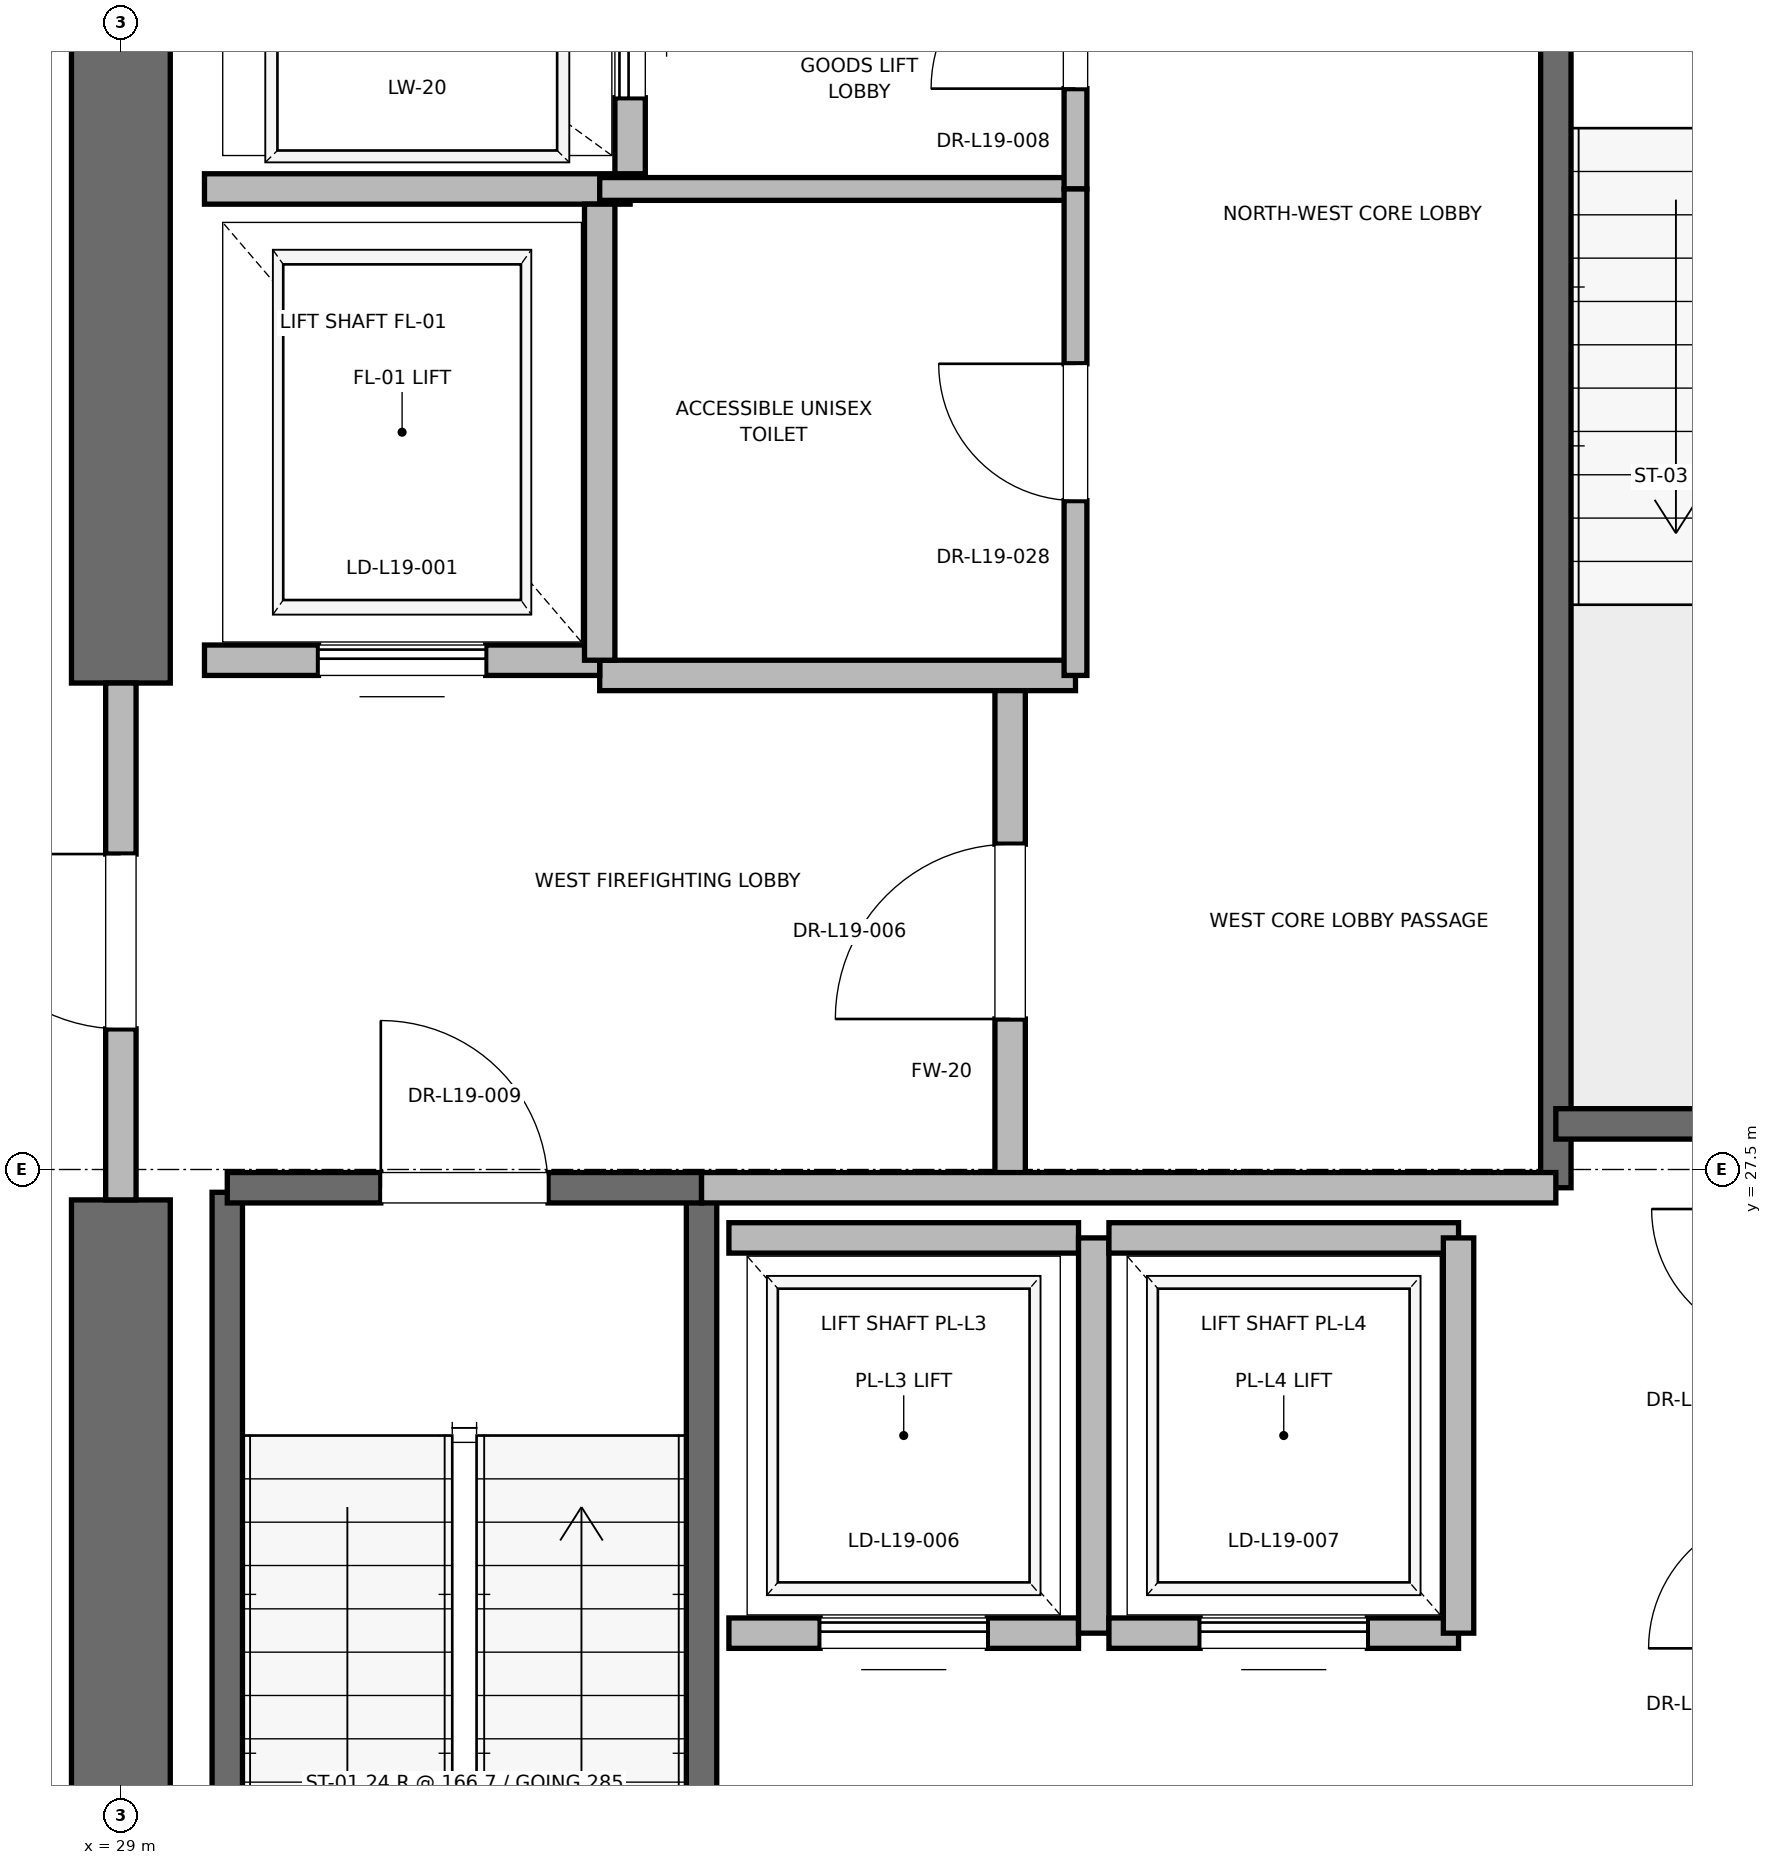
"""IFC4 building model, lengths in metres.
Left out: names, types, materials, properties, quantities, classifications, styles, units other than length and angle.
Written with IfcOpenShell. Run it as: python <this file> out.ifc"""

import sys

from ifc_helpers import new_model, si_unit, direction, frame, frame_2d, origin, place, context, subcontext, project, spatial, rectangle, extrude, element, fill, save


model = new_model("IFC4")
c1 = context("Model", 3, precision=1e-05, world=origin(), true_north=direction((0.0, 1.0)))
c2 = subcontext(c1, "Body", "Model", "MODEL_VIEW")
j1 = project(units=[si_unit("LENGTHUNIT", "METRE"), si_unit("PLANEANGLEUNIT", "RADIAN")], contexts=[c1])
p1 = place(None, origin())
s1 = spatial("IfcSite", under=j1, at=p1, CompositionType="ELEMENT")
p2 = place(p1, origin())
s2 = spatial("IfcBuilding", under=s1, at=p2, CompositionType="ELEMENT")
p3 = place(p2, frame((0.0, 0.0, 83.6)))
s3 = spatial("IfcBuildingStorey", under=s2, at=p3, CompositionType="ELEMENT", Elevation=83.6)
p4 = place(p3, frame((29.0, 18.5, 0.0), z_axis=(0.0, 0.0, 1.0), x_axis=(0.0, 1.0, 0.0)))
e1 = element("IfcWall", 1, at=p4, inside=s3, PredefinedType="SHEAR", context=c2, shape_type="SweptSolid", body=[
    extrude(rectangle(XDim=8.8, YDim=0.65, at=frame_2d((4.4, 0.0))), origin(), (0.0, 0.0, 1.0), 3.76),
])
p5 = place(p3, frame((29.0, 30.7, 0.0), z_axis=(0.0, 0.0, 1.0), x_axis=(0.0, 1.0, 0.0)))
e2 = element("IfcWall", 2, at=p5, inside=s3, PredefinedType="SHEAR", context=c2, shape_type="SweptSolid", body=[
    extrude(rectangle(XDim=5.8, YDim=0.65, at=frame_2d((2.9, 0.0))), origin(), (0.0, 0.0, 1.0), 3.76),
])
p6 = place(p3, frame((29.7, 19.2, 0.0), z_axis=(0.0, 0.0, 1.0), x_axis=(0.0, 1.0, 0.0)))
e3 = element("IfcWall", 3, at=p6, inside=s3, PredefinedType="SOLIDWALL", context=c2, shape_type="SweptSolid", body=[
    extrude(rectangle(XDim=8.15, YDim=0.2, at=frame_2d((4.075, 0.0))), origin(), (0.0, 0.0, 1.0), 3.76),
])
p7 = place(p3, frame((32.82, 18.6, 0.0), z_axis=(0.0, 0.0, 1.0), x_axis=(0.0, 1.0, 0.0)))
e4 = element("IfcWall", 4, at=p7, inside=s3, PredefinedType="SOLIDWALL", context=c2, shape_type="SweptSolid", body=[
    extrude(rectangle(XDim=8.78, YDim=0.2, at=frame_2d((4.39, 0.0))), origin(), (0.0, 0.0, 1.0), 3.76),
])
p8 = place(p3, frame((29.7, 27.38, 0.0), z_axis=(0.0, 0.0, 1.0), x_axis=(1.0, 0.0, 0.0)))
e5 = element("IfcWall", 5, at=p8, inside=s3, PredefinedType="SOLIDWALL", context=c2, shape_type="SweptSolid", body=[
    extrude(rectangle(XDim=3.12, YDim=0.2, at=frame_2d((1.56, 0.0))), origin(), (0.0, 0.0, 1.0), 3.76),
])
p9 = place(p8, frame((1.01, 0.0, 0.0)))
e6 = element("IfcOpeningElement", 6, at=p9, cuts=e5, PredefinedType="OPENING", context=c2, shape_type="SweptSolid", body=[
    extrude(rectangle(XDim=1.1, YDim=2.15, at=frame_2d((0.55, 1.075))), frame((0.0, 0.1, 0.0), z_axis=(0.0, -1.0, 0.0), x_axis=(1.0, 0.0, 0.0)), (0.0, 0.0, 1.0), 0.2),
])
p10 = place(p3, frame((38.44, 27.38, 0.0), z_axis=(0.0, 0.0, 1.0), x_axis=(0.0, 1.0, 0.0)))
e7 = element("IfcWall", 7, at=p10, inside=s3, PredefinedType="SOLIDWALL", context=c2, shape_type="SweptSolid", body=[
    extrude(rectangle(XDim=8.87, YDim=0.2, at=frame_2d((4.435, 0.0))), origin(), (0.0, 0.0, 1.0), 3.76),
])
p11 = place(p3, frame((38.44, 27.8, 0.0), z_axis=(0.0, 0.0, 1.0), x_axis=(1.0, 0.0, 0.0)))
e8 = element("IfcWall", 8, at=p11, inside=s3, PredefinedType="SOLIDWALL", context=c2, shape_type="SweptSolid", body=[
    extrude(rectangle(XDim=3.32, YDim=0.2, at=frame_2d((1.66, 0.0))), origin(), (0.0, 0.0, 1.0), 3.76),
])
p12 = place(p3, frame((34.85, 27.38, 0.0), z_axis=(0.0, 0.0, 1.0), x_axis=(0.0, 1.0, 0.0)))
e9 = element("IfcWall", 9, at=p12, inside=s3, PredefinedType="PARTITIONING", context=c2, shape_type="SweptSolid", body=[
    extrude(rectangle(XDim=3.37, YDim=0.2, at=frame_2d((1.685, 0.0))), origin(), (0.0, 0.0, 1.0), 3.76),
])
p13 = place(p12, frame((1.11, 0.0, 0.0)))
e10 = element("IfcOpeningElement", 10, at=p13, cuts=e9, PredefinedType="OPENING", context=c2, shape_type="SweptSolid", body=[
    extrude(rectangle(XDim=1.15, YDim=2.2, at=frame_2d((0.575, 1.1))), frame((0.0, 0.1, 0.0), z_axis=(0.0, -1.0, 0.0), x_axis=(1.0, 0.0, 0.0)), (0.0, 0.0, 1.0), 0.2),
])
p14 = place(p3, frame((29.0, 27.3, 0.0), z_axis=(0.0, 0.0, 1.0), x_axis=(0.0, 1.0, 0.0)))
e11 = element("IfcWall", 11, at=p14, inside=s3, PredefinedType="PARTITIONING", context=c2, shape_type="SweptSolid", body=[
    extrude(rectangle(XDim=3.4, YDim=0.2, at=frame_2d((1.7, 0.0))), origin(), (0.0, 0.0, 1.0), 2.54),
])
p15 = place(p14, frame((1.125, 0.0, 0.0)))
e12 = element("IfcOpeningElement", 12, at=p15, cuts=e11, PredefinedType="OPENING", context=c2, shape_type="SweptSolid", body=[
    extrude(rectangle(XDim=1.15, YDim=2.2, at=frame_2d((0.575, 1.1))), frame((0.0, 0.1, 0.0), z_axis=(0.0, -1.0, 0.0), x_axis=(1.0, 0.0, 0.0)), (0.0, 0.0, 1.0), 0.2),
])
p16 = place(p3, frame((32.82, 27.38, 0.0), z_axis=(0.0, 0.0, 1.0), x_axis=(1.0, 0.0, 0.0)))
e13 = element("IfcWall", 13, at=p16, inside=s3, PredefinedType="PARTITIONING", context=c2, shape_type="SweptSolid", body=[
    extrude(rectangle(XDim=5.62, YDim=0.2, at=frame_2d((2.81, 0.0))), origin(), (0.0, 0.0, 1.0), 3.76),
])
p17 = place(p3, frame((32.15, 30.75, 0.0), z_axis=(0.0, 0.0, 1.0), x_axis=(1.0, 0.0, 0.0)))
e14 = element("IfcWall", 14, at=p17, inside=s3, PredefinedType="PARTITIONING", context=c2, shape_type="SweptSolid", body=[
    extrude(rectangle(XDim=3.13, YDim=0.2, at=frame_2d((1.565, 0.0))), origin(), (0.0, 0.0, 1.0), 3.76),
])
p18 = place(p3, frame((29.55, 30.85, 0.0), z_axis=(0.0, 0.0, 1.0), x_axis=(1.0, 0.0, 0.0)))
e15 = element("IfcWall", 15, at=p18, inside=s3, PredefinedType="SOLIDWALL", context=c2, shape_type="SweptSolid", body=[
    extrude(rectangle(XDim=2.6, YDim=0.2, at=frame_2d((1.3, 0.0))), origin(), (0.0, 0.0, 1.0), 2.54),
])
p19 = place(p18, frame((0.75, 0.0, 0.0)))
e16 = element("IfcOpeningElement", 16, at=p19, cuts=e15, PredefinedType="OPENING", context=c2, shape_type="SweptSolid", body=[
    extrude(rectangle(XDim=1.1, YDim=2.2, at=frame_2d((0.55, 1.1))), frame((0.0, 0.1, 0.0), z_axis=(0.0, -1.0, 0.0), x_axis=(1.0, 0.0, 0.0)), (0.0, 0.0, 1.0), 0.2),
])
p20 = place(p3, frame((29.55, 33.95, 0.0), z_axis=(0.0, 0.0, 1.0), x_axis=(1.0, 0.0, 0.0)))
e17 = element("IfcWall", 17, at=p20, inside=s3, PredefinedType="SOLIDWALL", context=c2, shape_type="SweptSolid", body=[
    extrude(rectangle(XDim=2.8, YDim=0.2, at=frame_2d((1.4, 0.0))), origin(), (0.0, 0.0, 1.0), 3.76),
])
p21 = place(p3, frame((32.15, 30.85, 0.0), z_axis=(0.0, 0.0, 1.0), x_axis=(0.0, 1.0, 0.0)))
e18 = element("IfcWall", 18, at=p21, inside=s3, PredefinedType="SOLIDWALL", context=c2, shape_type="SweptSolid", body=[
    extrude(rectangle(XDim=3.0, YDim=0.2, at=frame_2d((1.5, 0.0))), origin(), (0.0, 0.0, 1.0), 3.76),
])
p22 = place(p3, frame((32.35, 34.05, 0.0), z_axis=(0.0, 0.0, 1.0), x_axis=(0.0, 1.0, 0.0)))
e19 = element("IfcWall", 19, at=p22, inside=s3, PredefinedType="SOLIDWALL", context=c2, shape_type="SweptSolid", body=[
    extrude(rectangle(XDim=2.1, YDim=0.2, at=frame_2d((1.05, 0.0))), origin(), (0.0, 0.0, 1.0), 3.76),
])
p23 = place(p22, frame((0.5, 0.0, 0.0)))
e20 = element("IfcOpeningElement", 20, at=p23, cuts=e19, PredefinedType="OPENING", context=c2, shape_type="SweptSolid", body=[
    extrude(rectangle(XDim=1.1, YDim=2.2, at=frame_2d((0.55, 1.1))), frame((0.0, 0.1, 0.0), z_axis=(0.0, -1.0, 0.0), x_axis=(1.0, 0.0, 0.0)), (0.0, 0.0, 1.0), 0.2),
])
p24 = place(p3, frame((33.0, 24.45, 0.0), z_axis=(0.0, 0.0, 1.0), x_axis=(1.0, 0.0, 0.0)))
e21 = element("IfcWall", 21, at=p24, inside=s3, PredefinedType="SOLIDWALL", context=c2, shape_type="SweptSolid", body=[
    extrude(rectangle(XDim=2.3, YDim=0.2, at=frame_2d((1.15, 0.0))), origin(), (0.0, 0.0, 1.0), 3.76),
])
p25 = place(p24, frame((0.6, 0.0, 0.0)))
e22 = element("IfcOpeningElement", 22, at=p25, cuts=e21, PredefinedType="OPENING", context=c2, shape_type="SweptSolid", body=[
    extrude(rectangle(XDim=1.1, YDim=2.2, at=frame_2d((0.55, 1.1))), frame((0.0, 0.1, 0.0), z_axis=(0.0, -1.0, 0.0), x_axis=(1.0, 0.0, 0.0)), (0.0, 0.0, 1.0), 0.2),
])
p26 = place(p3, frame((35.3, 27.05, 0.0), z_axis=(0.0, 0.0, 1.0), x_axis=(-1.0, 0.0, 0.0)))
e23 = element("IfcWall", 23, at=p26, inside=s3, PredefinedType="SOLIDWALL", context=c2, shape_type="SweptSolid", body=[
    extrude(rectangle(XDim=2.3, YDim=0.2, at=frame_2d((1.15, 0.0))), origin(), (0.0, 0.0, 1.0), 3.76),
])
p27 = place(p3, frame((35.4, 24.45, 0.0), z_axis=(0.0, 0.0, 1.0), x_axis=(0.0, 1.0, 0.0)))
e24 = element("IfcWall", 24, at=p27, inside=s3, PredefinedType="SOLIDWALL", context=c2, shape_type="SweptSolid", body=[
    extrude(rectangle(XDim=2.6, YDim=0.2, at=frame_2d((1.3, 0.0))), origin(), (0.0, 0.0, 1.0), 3.76),
])
p28 = place(p3, frame((35.5, 24.45, 0.0), z_axis=(0.0, 0.0, 1.0), x_axis=(1.0, 0.0, 0.0)))
e25 = element("IfcWall", 25, at=p28, inside=s3, PredefinedType="SOLIDWALL", context=c2, shape_type="SweptSolid", body=[
    extrude(rectangle(XDim=2.3, YDim=0.2, at=frame_2d((1.15, 0.0))), origin(), (0.0, 0.0, 1.0), 3.76),
])
p29 = place(p28, frame((0.6, 0.0, 0.0)))
e26 = element("IfcOpeningElement", 26, at=p29, cuts=e25, PredefinedType="OPENING", context=c2, shape_type="SweptSolid", body=[
    extrude(rectangle(XDim=1.1, YDim=2.2, at=frame_2d((0.55, 1.1))), frame((0.0, 0.1, 0.0), z_axis=(0.0, -1.0, 0.0), x_axis=(1.0, 0.0, 0.0)), (0.0, 0.0, 1.0), 0.2),
])
p30 = place(p3, frame((37.8, 27.05, 0.0), z_axis=(0.0, 0.0, 1.0), x_axis=(-1.0, 0.0, 0.0)))
e27 = element("IfcWall", 27, at=p30, inside=s3, PredefinedType="SOLIDWALL", context=c2, shape_type="SweptSolid", body=[
    extrude(rectangle(XDim=2.3, YDim=0.2, at=frame_2d((1.15, 0.0))), origin(), (0.0, 0.0, 1.0), 3.76),
])
p31 = place(p3, frame((37.8, 24.45, 0.0), z_axis=(0.0, 0.0, 1.0), x_axis=(0.0, 1.0, 0.0)))
e28 = element("IfcWall", 28, at=p31, inside=s3, PredefinedType="SOLIDWALL", context=c2, shape_type="SweptSolid", body=[
    extrude(rectangle(XDim=2.6, YDim=0.2, at=frame_2d((1.3, 0.0))), origin(), (0.0, 0.0, 1.0), 3.76),
])
p32 = place(p3, frame((32.15, 33.95, 0.0), z_axis=(0.0, 0.0, 1.0), x_axis=(1.0, 0.0, 0.0)))
e29 = element("IfcWall", 29, at=p32, inside=s3, PredefinedType="PARTITIONING", context=c2, shape_type="SweptSolid", body=[
    extrude(rectangle(XDim=3.13, YDim=0.15, at=frame_2d((1.565, 0.0))), origin(), (0.0, 0.0, 1.0), 2.85),
])
p33 = place(p3, frame((35.28, 33.95, 0.0), z_axis=(0.0, 0.0, 1.0), x_axis=(0.0, 1.0, 0.0)))
e30 = element("IfcWall", 30, at=p33, inside=s3, PredefinedType="PARTITIONING", context=c2, shape_type="SweptSolid", body=[
    extrude(rectangle(XDim=2.27, YDim=0.15, at=frame_2d((1.135, 0.0))), origin(), (0.0, 0.0, 1.0), 2.54),
])
p34 = place(p33, frame((0.66, 0.0, 0.0)))
e31 = element("IfcOpeningElement", 31, at=p34, cuts=e30, PredefinedType="OPENING", context=c2, shape_type="SweptSolid", body=[
    extrude(rectangle(XDim=0.95, YDim=2.15, at=frame_2d((0.475, 1.075))), frame((0.0, 0.075, 0.0), z_axis=(0.0, -1.0, 0.0), x_axis=(1.0, 0.0, 0.0)), (0.0, 0.0, 1.0), 0.15),
])
p35 = place(p3, frame((35.28, 30.75, 0.0), z_axis=(0.0, 0.0, 1.0), x_axis=(0.0, 1.0, 0.0)))
e32 = element("IfcWall", 32, at=p35, inside=s3, PredefinedType="PARTITIONING", context=c2, shape_type="SweptSolid", body=[
    extrude(rectangle(XDim=3.2, YDim=0.15, at=frame_2d((1.6, 0.0))), origin(), (0.0, 0.0, 1.0), 2.85),
])
p36 = place(p35, frame((1.15, 0.0, 0.0)))
e33 = element("IfcOpeningElement", 33, at=p36, cuts=e32, PredefinedType="OPENING", context=c2, shape_type="SweptSolid", body=[
    extrude(rectangle(XDim=0.9, YDim=2.1, at=frame_2d((0.45, 1.05))), frame((0.0, 0.075, 0.0), z_axis=(0.0, -1.0, 0.0), x_axis=(1.0, 0.0, 0.0)), (0.0, 0.0, 1.0), 0.15),
])
p37 = place(p9, origin())
e34 = element("IfcDoor", 34, at=p37, inside=s3, OperationType="SINGLE_SWING_LEFT", PredefinedType="DOOR", context=c2, shape_type="SweptSolid", body=[
    extrude(rectangle(XDim=1.1, YDim=2.15, at=frame_2d((0.55, 1.075))), frame((0.0, 0.025, 0.0), z_axis=(0.0, -1.0, 0.0), x_axis=(1.0, 0.0, 0.0)), (0.0, 0.0, 1.0), 0.05),
])
fill(e6, e34)
p38 = place(p13, origin())
e35 = element("IfcDoor", 35, at=p38, inside=s3, OperationType="SINGLE_SWING_LEFT", PredefinedType="DOOR", context=c2, shape_type="SweptSolid", body=[
    extrude(rectangle(XDim=1.15, YDim=2.2, at=frame_2d((0.575, 1.1))), frame((0.0, 0.025, 0.0), z_axis=(0.0, -1.0, 0.0), x_axis=(1.0, 0.0, 0.0)), (0.0, 0.0, 1.0), 0.05),
])
fill(e10, e35)
p39 = place(p15, origin())
e36 = element("IfcDoor", 36, at=p39, inside=s3, OperationType="SINGLE_SWING_RIGHT", PredefinedType="DOOR", context=c2, shape_type="SweptSolid", body=[
    extrude(rectangle(XDim=1.15, YDim=2.2, at=frame_2d((0.575, 1.1))), frame((0.0, 0.025, 0.0), z_axis=(0.0, -1.0, 0.0), x_axis=(1.0, 0.0, 0.0)), (0.0, 0.0, 1.0), 0.05),
])
fill(e12, e36)
p40 = place(p19, origin())
e37 = element("IfcDoor", 37, at=p40, inside=s3, OperationType="SLIDING_TO_RIGHT", PredefinedType="DOOR", context=c2, shape_type="SweptSolid", body=[
    extrude(rectangle(XDim=1.1, YDim=2.2, at=frame_2d((0.55, 1.1))), frame((0.0, 0.025, 0.0), z_axis=(0.0, -1.0, 0.0), x_axis=(1.0, 0.0, 0.0)), (0.0, 0.0, 1.0), 0.05),
])
fill(e16, e37)
p41 = place(p23, origin())
e38 = element("IfcDoor", 38, at=p41, inside=s3, OperationType="SLIDING_TO_RIGHT", PredefinedType="DOOR", context=c2, shape_type="SweptSolid", body=[
    extrude(rectangle(XDim=1.1, YDim=2.2, at=frame_2d((0.55, 1.1))), frame((0.0, 0.025, 0.0), z_axis=(0.0, -1.0, 0.0), x_axis=(1.0, 0.0, 0.0)), (0.0, 0.0, 1.0), 0.05),
])
fill(e20, e38)
p42 = place(p25, origin())
e39 = element("IfcDoor", 39, at=p42, inside=s3, OperationType="SLIDING_TO_RIGHT", PredefinedType="DOOR", context=c2, shape_type="SweptSolid", body=[
    extrude(rectangle(XDim=1.1, YDim=2.2, at=frame_2d((0.55, 1.1))), frame((0.0, 0.025, 0.0), z_axis=(0.0, -1.0, 0.0), x_axis=(1.0, 0.0, 0.0)), (0.0, 0.0, 1.0), 0.05),
])
fill(e22, e39)
p43 = place(p29, origin())
e40 = element("IfcDoor", 40, at=p43, inside=s3, OperationType="SLIDING_TO_RIGHT", PredefinedType="DOOR", context=c2, shape_type="SweptSolid", body=[
    extrude(rectangle(XDim=1.1, YDim=2.2, at=frame_2d((0.55, 1.1))), frame((0.0, 0.025, 0.0), z_axis=(0.0, -1.0, 0.0), x_axis=(1.0, 0.0, 0.0)), (0.0, 0.0, 1.0), 0.05),
])
fill(e26, e40)
p44 = place(p34, origin())
e41 = element("IfcDoor", 41, at=p44, inside=s3, OperationType="SINGLE_SWING_LEFT", PredefinedType="DOOR", context=c2, shape_type="SweptSolid", body=[
    extrude(rectangle(XDim=0.95, YDim=2.15, at=frame_2d((0.475, 1.075))), frame((0.0, 0.025, 0.0), z_axis=(0.0, -1.0, 0.0), x_axis=(1.0, 0.0, 0.0)), (0.0, 0.0, 1.0), 0.05),
])
fill(e31, e41)
p45 = place(p36, origin())
e42 = element("IfcDoor", 42, at=p45, inside=s3, OperationType="SINGLE_SWING_RIGHT", PredefinedType="DOOR", context=c2, shape_type="SweptSolid", body=[
    extrude(rectangle(XDim=0.9, YDim=2.1, at=frame_2d((0.45, 1.05))), frame((0.0, 0.025, 0.0), z_axis=(0.0, -1.0, 0.0), x_axis=(1.0, 0.0, 0.0)), (0.0, 0.0, 1.0), 0.05),
])
fill(e33, e42)
save(model, sys.argv[1])
